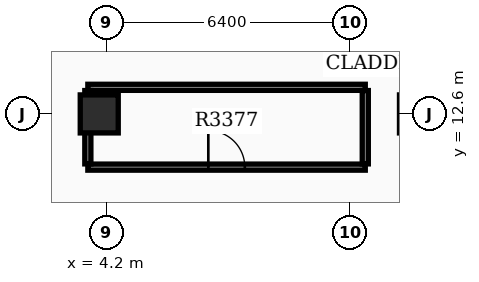
"""IFC4 building model, lengths in metres.
Left out: names, types, materials, properties, quantities, classifications, styles, units other than length and angle.
Written with IfcOpenShell. Run it as: python <this file> out.ifc"""

import sys

from ifc_helpers import new_model, si_unit, direction, frame, frame_2d, origin, origin_2d, place, context, subcontext, project, spatial, rectangle, extrude, element, fill, save


model = new_model("IFC4")
c1 = context("Model", 3, precision=1e-05, world=origin(), true_north=direction((0.0, 1.0)))
c2 = subcontext(c1, "Body", "Model", "MODEL_VIEW")
j1 = project(units=[si_unit("LENGTHUNIT", "METRE"), si_unit("PLANEANGLEUNIT", "RADIAN")], contexts=[c1])
p1 = place(None, origin())
s1 = spatial("IfcSite", under=j1, at=p1, CompositionType="ELEMENT")
p2 = place(p1, origin())
s2 = spatial("IfcBuilding", under=s1, at=p2, CompositionType="ELEMENT")
p3 = place(p2, frame((0.0, 0.0, 213.0)))
s3 = spatial("IfcBuildingStorey", under=s2, at=p3, CompositionType="ELEMENT", Elevation=213.0)
for number, where, z_axis, x_axis in (
    (1, (12.4, 12.6, 0.0), (0.0, 0.0, 1.0), (1.0, 0.0, 0.0)),
    (2, (4.0, 12.6, 0.0), (0.0, 0.0, 1.0), (1.0, 0.0, 0.0)),
):
    element("IfcColumn", number, at=place(p3, frame(where, z_axis=z_axis, x_axis=x_axis)), inside=s3, PredefinedType="COLUMN", context=c2, shape_type="SweptSolid", body=[
        extrude(rectangle(XDim=1.0, YDim=1.0, at=origin_2d()), origin(), (0.0, 0.0, 1.0), 3.9),
    ])
p4 = place(p3, frame((3.7, 11.2, 0.0), z_axis=(0.0, 0.0, 1.0), x_axis=(1.0, 0.0, 0.0)))
e3 = element("IfcWall", 3, at=p4, inside=s3, PredefinedType="PARTITIONING", context=c2, shape_type="SweptSolid", body=[
    extrude(rectangle(XDim=7.3, YDim=0.16, at=frame_2d((3.65, 0.0))), origin(), (0.0, 0.0, 1.0), 3.17),
])
p5 = place(p4, frame((3.17, 0.0, 0.0)))
e4 = element("IfcOpeningElement", 4, at=p5, cuts=e3, PredefinedType="OPENING", context=c2, shape_type="SweptSolid", body=[
    extrude(rectangle(XDim=0.96, YDim=2.15, at=frame_2d((0.48, 1.075))), frame((0.0, 0.09, 0.0), z_axis=(0.0, -1.0, 0.0), x_axis=(1.0, 0.0, 0.0)), (0.0, 0.0, 1.0), 0.18),
])
p6 = place(p3, frame((3.7, 13.3, 0.0), z_axis=(0.0, 0.0, 1.0), x_axis=(1.0, 0.0, 0.0)))
e5 = element("IfcWall", 5, at=p6, inside=s3, PredefinedType="PARTITIONING", context=c2, shape_type="SweptSolid", body=[
    extrude(rectangle(XDim=7.3, YDim=0.16, at=frame_2d((3.65, 0.0))), origin(), (0.0, 0.0, 1.0), 3.17),
])
for number, where, z_axis, x_axis in (
    (6, (3.7, 11.285, 0.0), (0.0, 0.0, 1.0), (0.0, 1.0, 0.0)),
    (7, (11.0, 11.285, 0.0), (0.0, 0.0, 1.0), (0.0, 1.0, 0.0)),
):
    element("IfcWall", number, at=place(p3, frame(where, z_axis=z_axis, x_axis=x_axis)), inside=s3, PredefinedType="PARTITIONING", context=c2, shape_type="SweptSolid", body=[
        extrude(rectangle(XDim=1.93, YDim=0.16, at=frame_2d((0.965, 0.0))), origin(), (0.0, 0.0, 1.0), 3.17),
    ])
p7 = place(p5, origin())
e8 = element("IfcDoor", 8, at=p7, inside=s3, OperationType="SINGLE_SWING_LEFT", PredefinedType="DOOR", context=c2, shape_type="SweptSolid", body=[
    extrude(rectangle(XDim=0.96, YDim=2.15, at=frame_2d((0.48, 1.075))), frame((0.0, 0.025, 0.0), z_axis=(0.0, -1.0, 0.0), x_axis=(1.0, 0.0, 0.0)), (0.0, 0.0, 1.0), 0.05),
])
fill(e4, e8)
save(model, sys.argv[1])
